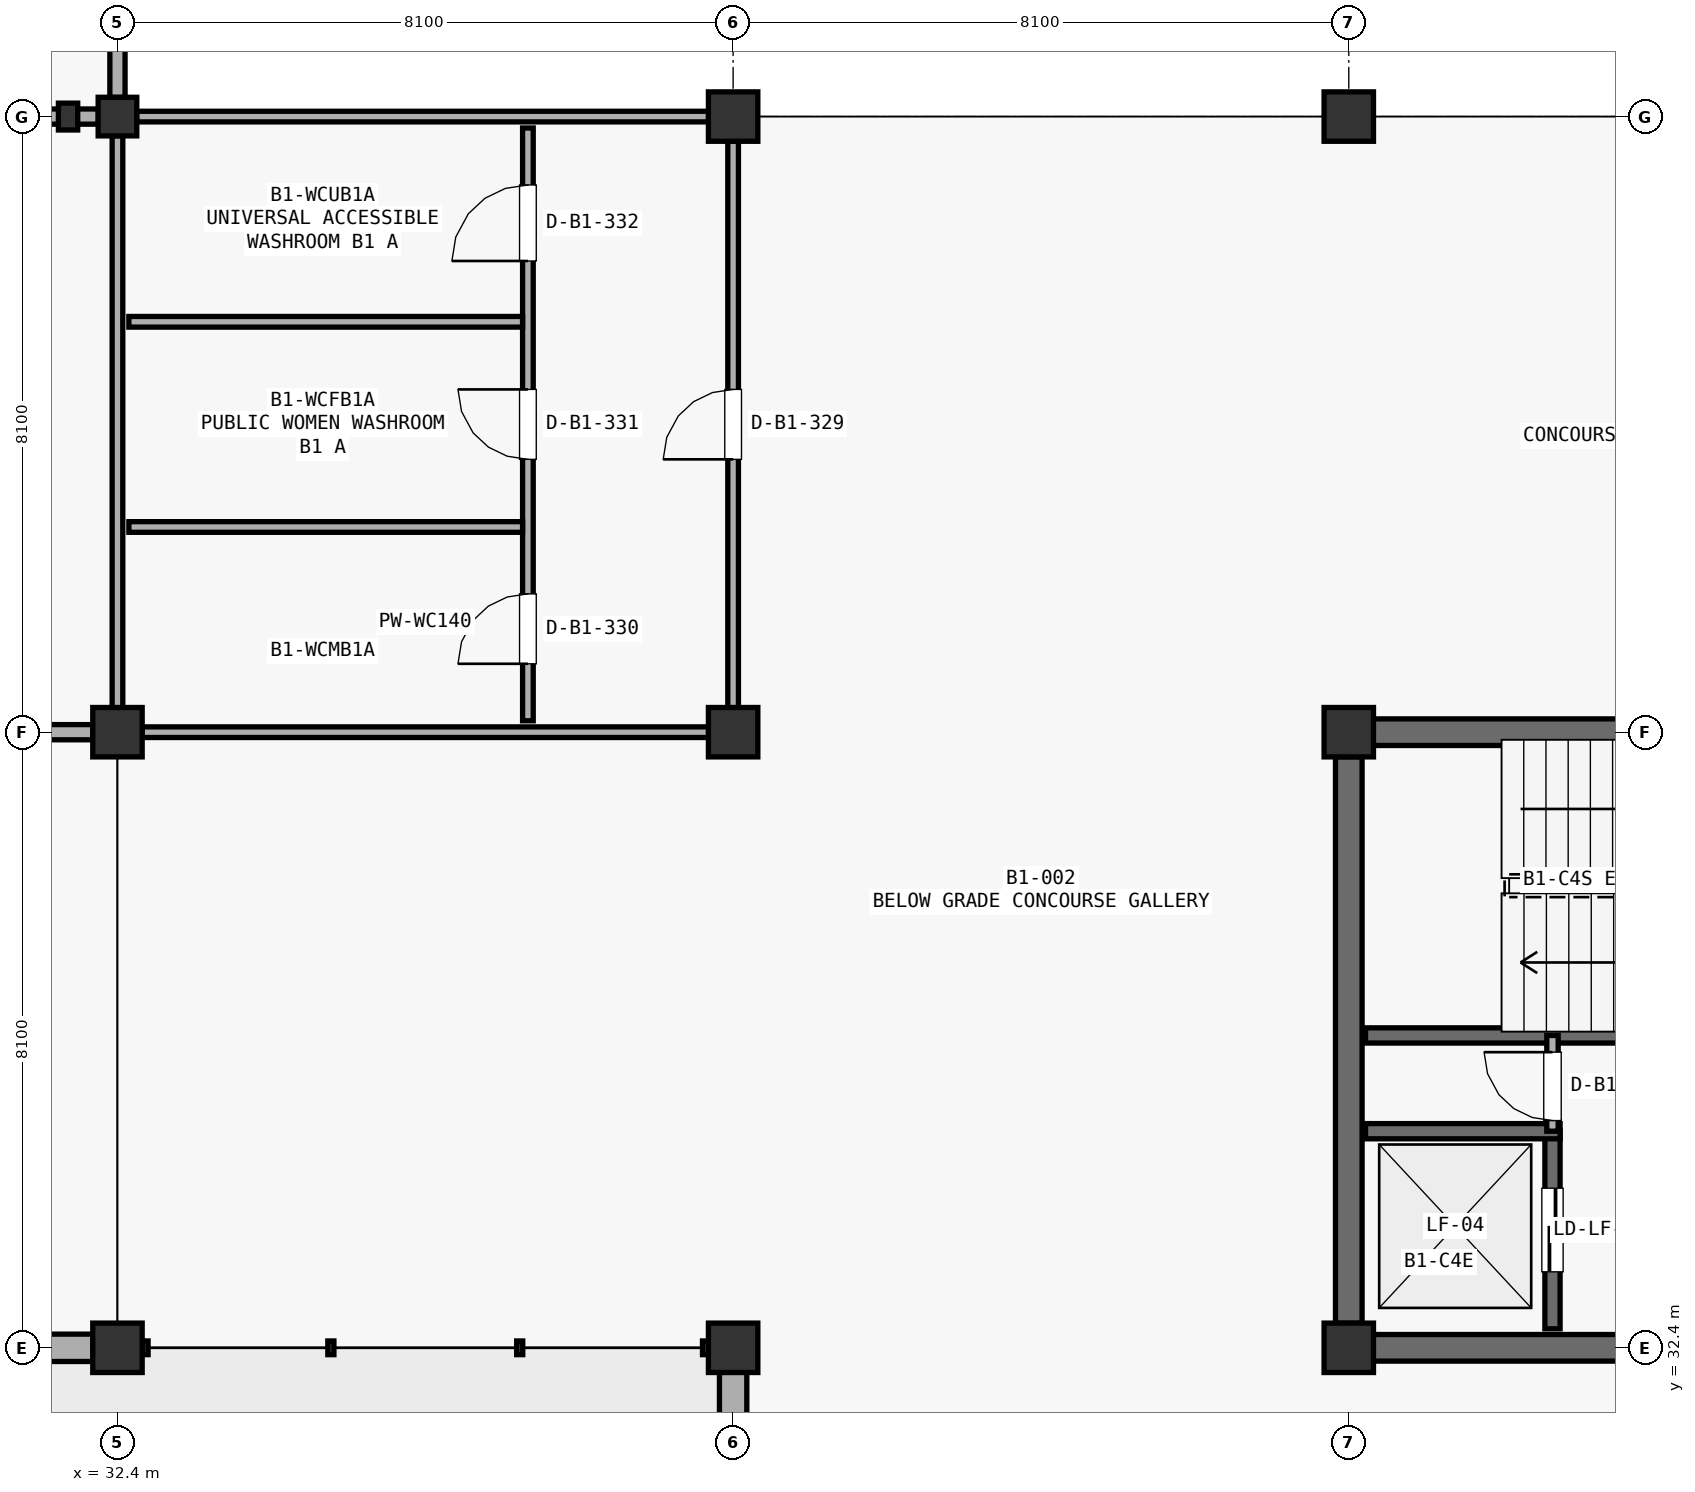
"""IFC4 building model, lengths in metres.
Left out: names, types, materials, properties, quantities, classifications, styles, units other than length and angle.
Written with IfcOpenShell. Run it as: python <this file> out.ifc"""

import sys

from ifc_helpers import new_model, si_unit, direction, frame, frame_2d, origin, origin_2d, place, context, subcontext, project, spatial, rectangle, hollow_circle, i_section, extrude, element, fill, save


model = new_model("IFC4")
c1 = context("Model", 3, precision=1e-05, world=origin(), true_north=direction((0.0, 1.0)))
c2 = subcontext(c1, "Body", "Model", "MODEL_VIEW")
j1 = project(units=[si_unit("LENGTHUNIT", "METRE"), si_unit("PLANEANGLEUNIT", "RADIAN")], contexts=[c1])
p1 = place(None, origin())
s1 = spatial("IfcSite", under=j1, at=p1, CompositionType="ELEMENT")
p2 = place(p1, origin())
s2 = spatial("IfcBuilding", under=s1, at=p2, CompositionType="ELEMENT")
p3 = place(p2, frame((0.0, 0.0, -5.1)))
s3 = spatial("IfcBuildingStorey", under=s2, at=p3, CompositionType="ELEMENT", Elevation=-5.1)
for number, where, z_axis, x_axis in (
    (1, (32.4, 32.4, 0.0), (0.0, 0.0, 1.0), (1.0, 0.0, 0.0)),
    (2, (32.4, 40.5, 0.0), (0.0, 0.0, 1.0), (1.0, 0.0, 0.0)),
):
    element("IfcColumn", number, at=place(p3, frame(where, z_axis=z_axis, x_axis=x_axis)), inside=s3, PredefinedType="COLUMN", context=c2, shape_type="SweptSolid", body=[
        extrude(rectangle(XDim=0.65, YDim=0.65, at=origin_2d()), origin(), (0.0, 0.0, 1.0), 5.1),
    ])
p4 = place(p3, frame((32.4, 48.6, 0.0), z_axis=(0.0, 0.0, 1.0), x_axis=(1.0, 0.0, 0.0)))
e3 = element("IfcColumn", 3, at=p4, inside=s3, PredefinedType="COLUMN", context=c2, shape_type="SweptSolid", body=[
    extrude(hollow_circle(Radius=0.254, WallThickness=0.019, at=origin_2d()), origin(), (0.0, 0.0, 1.0), 5.1),
])
for number, where, z_axis, x_axis in (
    (4, (40.5, 32.4, 0.0), (0.0, 0.0, 1.0), (1.0, 0.0, 0.0)),
    (5, (40.5, 40.5, 0.0), (0.0, 0.0, 1.0), (1.0, 0.0, 0.0)),
    (6, (40.5, 48.6, 0.0), (0.0, 0.0, 1.0), (1.0, 0.0, 0.0)),
    (7, (48.6, 32.4, 0.0), (0.0, 0.0, 1.0), (1.0, 0.0, 0.0)),
    (8, (48.6, 40.5, 0.0), (0.0, 0.0, 1.0), (1.0, 0.0, 0.0)),
    (9, (48.6, 48.6, 0.0), (0.0, 0.0, 1.0), (1.0, 0.0, 0.0)),
):
    element("IfcColumn", number, at=place(p3, frame(where, z_axis=z_axis, x_axis=x_axis)), inside=s3, PredefinedType="COLUMN", context=c2, shape_type="SweptSolid", body=[
        extrude(rectangle(XDim=0.65, YDim=0.65, at=origin_2d()), origin(), (0.0, 0.0, 1.0), 5.1),
    ])
p5 = place(p3, frame((31.75, 48.6, 0.0), z_axis=(0.0, 0.0, 1.0), x_axis=(1.0, 0.0, 0.0)))
e10 = element("IfcColumn", 10, at=p5, inside=s3, PredefinedType="PILASTER", context=c2, shape_type="SweptSolid", body=[
    extrude(i_section(OverallWidth=0.254, OverallDepth=0.353, WebThickness=0.01, FlangeThickness=0.016, FilletRadius=0.016, at=origin_2d()), origin(), (0.0, 0.0, 1.0), 4.724),
])
p6 = place(p3, frame((24.623, 32.4, 0.0), z_axis=(0.0, 0.0, 1.0), x_axis=(1.0, 0.0, 0.0)))
e11 = element("IfcWall", 11, at=p6, inside=s3, PredefinedType="STANDARD", context=c2, shape_type="SweptSolid", body=[
    extrude(rectangle(XDim=7.454, YDim=0.36, at=frame_2d((3.727, 0.0))), origin(), (0.0, 0.0, 1.0), 4.465),
])
p7 = place(p6, frame((2.627, 0.0, 0.0)))
e12 = element("IfcOpeningElement", 12, at=p7, cuts=e11, PredefinedType="OPENING", context=c2, shape_type="SweptSolid", body=[
    extrude(rectangle(XDim=2.2, YDim=2.4, at=frame_2d((1.1, 1.2))), frame((0.0, 0.19, 0.0), z_axis=(0.0, -1.0, 0.0), x_axis=(1.0, 0.0, 0.0)), (0.0, 0.0, 1.0), 0.38),
])
p8 = place(p3, frame((40.5, 24.45, 0.0), z_axis=(0.0, 0.0, 1.0), x_axis=(0.0, 1.0, 0.0)))
e13 = element("IfcWall", 13, at=p8, inside=s3, PredefinedType="STANDARD", context=c2, shape_type="SweptSolid", body=[
    extrude(rectangle(XDim=7.626, YDim=0.36, at=frame_2d((3.813, 0.0))), origin(), (0.0, 0.0, 1.0), 4.516),
])
p9 = place(p8, frame((2.313, 0.0, 0.85)))
e14 = element("IfcOpeningElement", 14, at=p9, cuts=e13, PredefinedType="OPENING", context=c2, shape_type="SweptSolid", body=[
    extrude(rectangle(XDim=3.0, YDim=1.9, at=frame_2d((1.5, 0.95))), frame((0.0, 0.19, 0.0), z_axis=(0.0, -1.0, 0.0), x_axis=(1.0, 0.0, 0.0)), (0.0, 0.0, 1.0), 0.38),
])
p10 = place(p3, frame((48.923, 40.5, 0.0), z_axis=(0.0, 0.0, 1.0), x_axis=(1.0, 0.0, 0.0)))
e15 = element("IfcWall", 15, at=p10, inside=s3, PredefinedType="SHEAR", context=c2, shape_type="SweptSolid", body=[
    extrude(rectangle(XDim=7.777, YDim=0.35, at=frame_2d((3.888, 0.0))), origin(), (0.0, 0.0, 1.0), 4.682),
])
p11 = place(p10, frame((5.527, 0.0, 0.0)))
e16 = element("IfcOpeningElement", 16, at=p11, cuts=e15, PredefinedType="OPENING", context=c2, shape_type="SweptSolid", body=[
    extrude(rectangle(XDim=1.2, YDim=2.2, at=frame_2d((0.6, 1.1))), frame((0.0, 0.185, 0.0), z_axis=(0.0, -1.0, 0.0), x_axis=(1.0, 0.0, 0.0)), (0.0, 0.0, 1.0), 0.37),
])
p12 = place(p3, frame((48.6, 32.723, 0.0), z_axis=(0.0, 0.0, 1.0), x_axis=(0.0, 1.0, 0.0)))
e17 = element("IfcWall", 17, at=p12, inside=s3, PredefinedType="SHEAR", context=c2, shape_type="SweptSolid", body=[
    extrude(rectangle(XDim=7.454, YDim=0.35, at=frame_2d((3.727, 0.0))), origin(), (0.0, 0.0, 1.0), 4.682),
])
p13 = place(p3, frame((48.923, 32.4, 0.0), z_axis=(0.0, 0.0, 1.0), x_axis=(1.0, 0.0, 0.0)))
e18 = element("IfcWall", 18, at=p13, inside=s3, PredefinedType="SHEAR", context=c2, shape_type="SweptSolid", body=[
    extrude(rectangle(XDim=7.454, YDim=0.35, at=frame_2d((3.727, 0.0))), origin(), (0.0, 0.0, 1.0), 4.682),
])
p14 = place(p13, frame((4.327, 0.0, 0.0)))
e19 = element("IfcOpeningElement", 19, at=p14, cuts=e18, PredefinedType="OPENING", context=c2, shape_type="SweptSolid", body=[
    extrude(rectangle(XDim=1.2, YDim=2.2, at=frame_2d((0.6, 1.1))), frame((0.0, 0.185, 0.0), z_axis=(0.0, -1.0, 0.0), x_axis=(1.0, 0.0, 0.0)), (0.0, 0.0, 1.0), 0.37),
])
p15 = place(p3, frame((48.82, 36.51, 0.0), z_axis=(0.0, 0.0, 1.0), x_axis=(1.0, 0.0, 0.0)))
e20 = element("IfcWall", 20, at=p15, inside=s3, PredefinedType="SHEAR", context=c2, shape_type="SweptSolid", body=[
    extrude(rectangle(XDim=7.66, YDim=0.2, at=frame_2d((3.83, 0.0))), origin(), (0.0, 0.0, 1.0), 4.682),
])
p16 = place(p15, frame((6.11, 0.0, 0.0)))
e21 = element("IfcOpeningElement", 21, at=p16, cuts=e20, PredefinedType="OPENING", context=c2, shape_type="SweptSolid", body=[
    extrude(rectangle(XDim=1.15, YDim=2.2, at=frame_2d((0.575, 1.1))), frame((0.0, 0.11, 0.0), z_axis=(0.0, -1.0, 0.0), x_axis=(1.0, 0.0, 0.0)), (0.0, 0.0, 1.0), 0.22),
])
p17 = place(p3, frame((51.28, 32.65, 0.0), z_axis=(0.0, 0.0, 1.0), x_axis=(0.0, 1.0, 0.0)))
e22 = element("IfcWall", 22, at=p17, inside=s3, PredefinedType="SHEAR", context=c2, shape_type="SweptSolid", body=[
    extrude(rectangle(XDim=2.6, YDim=0.2, at=frame_2d((1.3, 0.0))), origin(), (0.0, 0.0, 1.0), 4.682),
])
p18 = place(p17, frame((0.75, 0.0, 0.0)))
e23 = element("IfcOpeningElement", 23, at=p18, cuts=e22, PredefinedType="OPENING", context=c2, shape_type="SweptSolid", body=[
    extrude(rectangle(XDim=1.1, YDim=2.2, at=frame_2d((0.55, 1.1))), frame((0.0, 0.11, 0.0), z_axis=(0.0, -1.0, 0.0), x_axis=(1.0, 0.0, 0.0)), (0.0, 0.0, 1.0), 0.22),
])
p19 = place(p3, frame((48.82, 35.25, 0.0), z_axis=(0.0, 0.0, 1.0), x_axis=(1.0, 0.0, 0.0)))
e24 = element("IfcWall", 24, at=p19, inside=s3, PredefinedType="SHEAR", context=c2, shape_type="SweptSolid", body=[
    extrude(rectangle(XDim=2.56, YDim=0.2, at=frame_2d((1.28, 0.0))), origin(), (0.0, 0.0, 1.0), 4.682),
])
p20 = place(p3, frame((51.28, 35.25, 0.0), z_axis=(0.0, 0.0, 1.0), x_axis=(0.0, 1.0, 0.0)))
e25 = element("IfcWall", 25, at=p20, inside=s3, PredefinedType="PARTITIONING", context=c2, shape_type="SweptSolid", body=[
    extrude(rectangle(XDim=1.26, YDim=0.15, at=frame_2d((0.63, 0.0))), origin(), (0.0, 0.0, 1.0), 4.682),
])
p21 = place(p20, frame((0.14, 0.0, 0.0)))
e26 = element("IfcOpeningElement", 26, at=p21, cuts=e25, PredefinedType="OPENING", context=c2, shape_type="SweptSolid", body=[
    extrude(rectangle(XDim=0.9, YDim=2.15, at=frame_2d((0.45, 1.075))), frame((0.0, 0.085, 0.0), z_axis=(0.0, -1.0, 0.0), x_axis=(1.0, 0.0, 0.0)), (0.0, 0.0, 1.0), 0.17),
])
p22 = place(p3, frame((32.723, 40.5, 0.0), z_axis=(0.0, 0.0, 1.0), x_axis=(1.0, 0.0, 0.0)))
e27 = element("IfcWall", 27, at=p22, inside=s3, PredefinedType="PARTITIONING", context=c2, shape_type="SweptSolid", body=[
    extrude(rectangle(XDim=7.454, YDim=0.14, at=frame_2d((3.727, 0.0))), origin(), (0.0, 0.0, 1.0), 4.424),
])
p23 = place(p3, frame((32.652, 48.6, 0.0), z_axis=(0.0, 0.0, 1.0), x_axis=(1.0, 0.0, 0.0)))
e28 = element("IfcWall", 28, at=p23, inside=s3, PredefinedType="PARTITIONING", context=c2, shape_type="SweptSolid", body=[
    extrude(rectangle(XDim=7.525, YDim=0.14, at=frame_2d((3.762, 0.0))), origin(), (0.0, 0.0, 1.0), 4.231),
])
p24 = place(p3, frame((32.4, 40.823, 0.0), z_axis=(0.0, 0.0, 1.0), x_axis=(0.0, 1.0, 0.0)))
e29 = element("IfcWall", 29, at=p24, inside=s3, PredefinedType="PARTITIONING", context=c2, shape_type="SweptSolid", body=[
    extrude(rectangle(XDim=7.525, YDim=0.14, at=frame_2d((3.762, 0.0))), origin(), (0.0, 0.0, 1.0), 4.364),
])
p25 = place(p3, frame((40.5, 40.823, 0.0), z_axis=(0.0, 0.0, 1.0), x_axis=(0.0, 1.0, 0.0)))
e30 = element("IfcWall", 30, at=p25, inside=s3, PredefinedType="PARTITIONING", context=c2, shape_type="SweptSolid", body=[
    extrude(rectangle(XDim=7.454, YDim=0.14, at=frame_2d((3.727, 0.0))), origin(), (0.0, 0.0, 1.0), 4.231),
])
p26 = place(p25, frame((3.267, 0.0, 0.0)))
e31 = element("IfcOpeningElement", 31, at=p26, cuts=e30, PredefinedType="OPENING", context=c2, shape_type="SweptSolid", body=[
    extrude(rectangle(XDim=0.92, YDim=2.15, at=frame_2d((0.46, 1.075))), frame((0.0, 0.08, 0.0), z_axis=(0.0, -1.0, 0.0), x_axis=(1.0, 0.0, 0.0)), (0.0, 0.0, 1.0), 0.16),
])
p27 = place(p3, frame((37.8, 40.65, 0.0), z_axis=(0.0, 0.0, 1.0), x_axis=(0.0, 1.0, 0.0)))
e32 = element("IfcWall", 32, at=p27, inside=s3, PredefinedType="PARTITIONING", context=c2, shape_type="SweptSolid", body=[
    extrude(rectangle(XDim=7.8, YDim=0.14, at=frame_2d((3.9, 0.0))), origin(), (0.0, 0.0, 1.0), 4.782),
])
p28 = place(p27, frame((0.75, 0.0, 0.0)))
e33 = element("IfcOpeningElement", 33, at=p28, cuts=e32, PredefinedType="OPENING", context=c2, shape_type="SweptSolid", body=[
    extrude(rectangle(XDim=0.92, YDim=2.15, at=frame_2d((0.46, 1.075))), frame((0.0, 0.08, 0.0), z_axis=(0.0, -1.0, 0.0), x_axis=(1.0, 0.0, 0.0)), (0.0, 0.0, 1.0), 0.16),
])
p29 = place(p27, frame((3.44, 0.0, 0.0)))
e34 = element("IfcOpeningElement", 34, at=p29, cuts=e32, PredefinedType="OPENING", context=c2, shape_type="SweptSolid", body=[
    extrude(rectangle(XDim=0.92, YDim=2.15, at=frame_2d((0.46, 1.075))), frame((0.0, 0.08, 0.0), z_axis=(0.0, -1.0, 0.0), x_axis=(1.0, 0.0, 0.0)), (0.0, 0.0, 1.0), 0.16),
])
p30 = place(p27, frame((6.05, 0.0, 0.0)))
e35 = element("IfcOpeningElement", 35, at=p30, cuts=e32, PredefinedType="OPENING", context=c2, shape_type="SweptSolid", body=[
    extrude(rectangle(XDim=1.0, YDim=2.15, at=frame_2d((0.5, 1.075))), frame((0.0, 0.08, 0.0), z_axis=(0.0, -1.0, 0.0), x_axis=(1.0, 0.0, 0.0)), (0.0, 0.0, 1.0), 0.16),
])
for number, where, z_axis, x_axis in (
    (36, (32.55, 43.2, 0.0), (0.0, 0.0, 1.0), (1.0, 0.0, 0.0)),
    (37, (32.55, 45.9, 0.0), (0.0, 0.0, 1.0), (1.0, 0.0, 0.0)),
):
    element("IfcWall", number, at=place(p3, frame(where, z_axis=z_axis, x_axis=x_axis)), inside=s3, PredefinedType="PARTITIONING", context=c2, shape_type="SweptSolid", body=[
        extrude(rectangle(XDim=5.18, YDim=0.14, at=frame_2d((2.59, 0.0))), origin(), (0.0, 0.0, 1.0), 4.782),
    ])
p31 = place(p3, frame((32.4, 48.852, 0.0), z_axis=(0.0, 0.0, 1.0), x_axis=(0.0, 1.0, 0.0)))
e38 = element("IfcWall", 38, at=p31, inside=s3, PredefinedType="PARTITIONING", context=c2, shape_type="SweptSolid", body=[
    extrude(rectangle(XDim=7.673, YDim=0.2, at=frame_2d((3.837, 0.0))), origin(), (0.0, 0.0, 1.0), 4.173),
])
p32 = place(p3, frame((24.623, 48.6, 0.0), z_axis=(0.0, 0.0, 1.0), x_axis=(1.0, 0.0, 0.0)))
e39 = element("IfcWall", 39, at=p32, inside=s3, PredefinedType="PARTITIONING", context=c2, shape_type="SweptSolid", body=[
    extrude(rectangle(XDim=7.525, YDim=0.2, at=frame_2d((3.762, 0.0))), origin(), (0.0, 0.0, 1.0), 4.307),
])
p33 = place(p3, frame((24.623, 40.5, 0.0), z_axis=(0.0, 0.0, 1.0), x_axis=(1.0, 0.0, 0.0)))
e40 = element("IfcWall", 40, at=p33, inside=s3, PredefinedType="PARTITIONING", context=c2, shape_type="SweptSolid", body=[
    extrude(rectangle(XDim=7.454, YDim=0.2, at=frame_2d((3.727, 0.0))), origin(), (0.0, 0.0, 1.0), 4.456),
])
p34 = place(p18, origin())
e41 = element("IfcDoor", 41, at=p34, inside=s3, OperationType="SLIDING_TO_LEFT", PredefinedType="DOOR", context=c2, shape_type="SweptSolid", body=[
    extrude(rectangle(XDim=1.1, YDim=2.2, at=frame_2d((0.55, 1.1))), frame((0.0, 0.025, 0.0), z_axis=(0.0, -1.0, 0.0), x_axis=(1.0, 0.0, 0.0)), (0.0, 0.0, 1.0), 0.05),
])
fill(e23, e41)
p35 = place(p21, origin())
e42 = element("IfcDoor", 42, at=p35, inside=s3, OperationType="SINGLE_SWING_RIGHT", PredefinedType="DOOR", context=c2, shape_type="SweptSolid", body=[
    extrude(rectangle(XDim=0.9, YDim=2.15, at=frame_2d((0.45, 1.075))), frame((0.0, 0.025, 0.0), z_axis=(0.0, -1.0, 0.0), x_axis=(1.0, 0.0, 0.0)), (0.0, 0.0, 1.0), 0.05),
])
fill(e26, e42)
p36 = place(p26, origin())
e43 = element("IfcDoor", 43, at=p36, inside=s3, OperationType="SINGLE_SWING_LEFT", PredefinedType="DOOR", context=c2, shape_type="SweptSolid", body=[
    extrude(rectangle(XDim=0.92, YDim=2.15, at=frame_2d((0.46, 1.075))), frame((0.0, 0.025, 0.0), z_axis=(0.0, -1.0, 0.0), x_axis=(1.0, 0.0, 0.0)), (0.0, 0.0, 1.0), 0.05),
])
fill(e31, e43)
p37 = place(p28, origin())
e44 = element("IfcDoor", 44, at=p37, inside=s3, OperationType="SINGLE_SWING_LEFT", PredefinedType="DOOR", context=c2, shape_type="SweptSolid", body=[
    extrude(rectangle(XDim=0.92, YDim=2.15, at=frame_2d((0.46, 1.075))), frame((0.0, 0.025, 0.0), z_axis=(0.0, -1.0, 0.0), x_axis=(1.0, 0.0, 0.0)), (0.0, 0.0, 1.0), 0.05),
])
fill(e33, e44)
p38 = place(p29, origin())
e45 = element("IfcDoor", 45, at=p38, inside=s3, OperationType="SINGLE_SWING_RIGHT", PredefinedType="DOOR", context=c2, shape_type="SweptSolid", body=[
    extrude(rectangle(XDim=0.92, YDim=2.15, at=frame_2d((0.46, 1.075))), frame((0.0, 0.025, 0.0), z_axis=(0.0, -1.0, 0.0), x_axis=(1.0, 0.0, 0.0)), (0.0, 0.0, 1.0), 0.05),
])
fill(e34, e45)
p39 = place(p30, origin())
e46 = element("IfcDoor", 46, at=p39, inside=s3, OperationType="SINGLE_SWING_LEFT", PredefinedType="DOOR", context=c2, shape_type="SweptSolid", body=[
    extrude(rectangle(XDim=1.0, YDim=2.15, at=frame_2d((0.5, 1.075))), frame((0.0, 0.025, 0.0), z_axis=(0.0, -1.0, 0.0), x_axis=(1.0, 0.0, 0.0)), (0.0, 0.0, 1.0), 0.05),
])
fill(e35, e46)
save(model, sys.argv[1])
